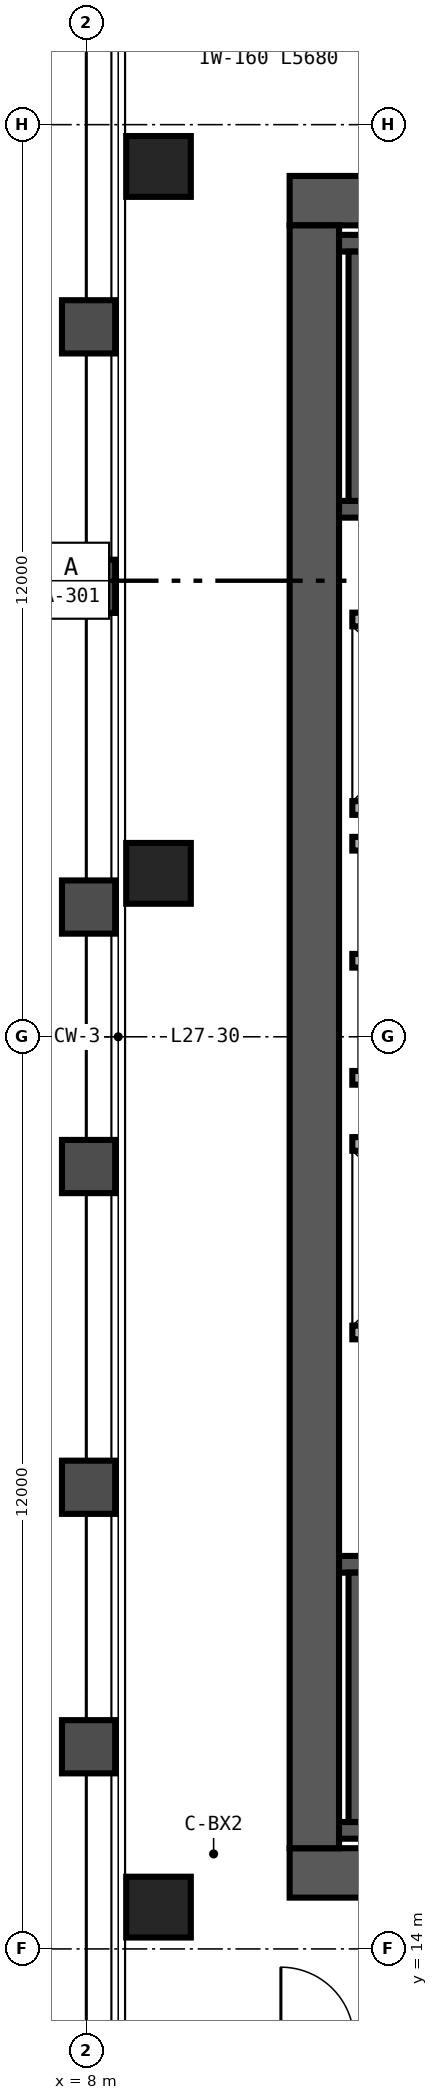
"""IFC4 building model, lengths in metres.
Left out: names, types, materials, properties, quantities, classifications, styles, units other than length and angle.
Written with IfcOpenShell. Run it as: python <this file> out.ifc"""

import sys

from ifc_helpers import new_model, si_unit, direction, frame, frame_2d, origin, origin_2d, place, context, subcontext, project, spatial, rectangle, hollow_rectangle, extrude, source, transform, mapped, element, save


model = new_model("IFC4")
c1 = context("Model", 3, precision=1e-05, world=origin(), true_north=direction((0.0, 1.0)))
c2 = subcontext(c1, "Body", "Model", "MODEL_VIEW")
j1 = project(units=[si_unit("LENGTHUNIT", "METRE"), si_unit("PLANEANGLEUNIT", "RADIAN")], contexts=[c1])
p1 = place(None, origin())
s1 = spatial("IfcSite", under=j1, at=p1, CompositionType="ELEMENT")
p2 = place(p1, origin())
s2 = spatial("IfcBuilding", under=s1, at=p2, CompositionType="ELEMENT")
p3 = place(p2, frame((0.0, 0.0, 111.6)))
s3 = spatial("IfcBuildingStorey", under=s2, at=p3, CompositionType="ELEMENT", Elevation=111.6)
p4 = place(p3, frame((10.675, 15.0, 0.0), z_axis=(0.0, 0.0, 1.0), x_axis=(1.0, 0.0, 0.0)))
e1 = element("IfcWall", 1, at=p4, inside=s3, PredefinedType="SHEAR", context=c2, shape_type="SweptSolid", body=[
    extrude(rectangle(XDim=12.65, YDim=0.65, at=frame_2d((6.325, 0.0))), origin(), (0.0, 0.0, 1.0), 3.36),
])
p5 = place(p4, frame((10.225, 0.0, 0.0)))
e2 = element("IfcOpeningElement", 2, at=p5, cuts=e1, PredefinedType="OPENING", context=c2, shape_type="SweptSolid", body=[
    extrude(rectangle(XDim=1.0, YDim=2.15, at=frame_2d((0.5, 1.075))), frame((0.0, 0.335, 0.0), z_axis=(0.0, -1.0, 0.0), x_axis=(1.0, 0.0, 0.0)), (0.0, 0.0, 1.0), 0.67),
])
p6 = place(p3, frame((10.675, 37.0, 0.0), z_axis=(0.0, 0.0, 1.0), x_axis=(1.0, 0.0, 0.0)))
e3 = element("IfcWall", 3, at=p6, inside=s3, PredefinedType="SHEAR", context=c2, shape_type="SweptSolid", body=[
    extrude(rectangle(XDim=12.65, YDim=0.65, at=frame_2d((6.325, 0.0))), origin(), (0.0, 0.0, 1.0), 3.36),
])
p7 = place(p6, frame((8.905, 0.0, 0.0)))
e4 = element("IfcOpeningElement", 4, at=p7, cuts=e3, PredefinedType="OPENING", context=c2, shape_type="SweptSolid", body=[
    extrude(rectangle(XDim=1.0, YDim=2.15, at=frame_2d((0.5, 1.075))), frame((0.0, 0.335, 0.0), z_axis=(0.0, -1.0, 0.0), x_axis=(1.0, 0.0, 0.0)), (0.0, 0.0, 1.0), 0.67),
])
p8 = place(p3, frame((11.0, 15.325, 0.0), z_axis=(0.0, 0.0, 1.0), x_axis=(0.0, 1.0, 0.0)))
e5 = element("IfcWall", 5, at=p8, inside=s3, PredefinedType="SHEAR", context=c2, shape_type="SweptSolid", body=[
    extrude(rectangle(XDim=21.35, YDim=0.65, at=frame_2d((10.675, 0.0))), origin(), (0.0, 0.0, 1.0), 3.36),
])
p9 = place(p3, frame((11.325, 15.56, 0.0), z_axis=(0.0, 0.0, 1.0), x_axis=(1.0, 0.0, 0.0)))
e6 = element("IfcWall", 6, at=p9, inside=s3, PredefinedType="SHEAR", context=c2, shape_type="SweptSolid", body=[
    extrude(rectangle(XDim=7.985, YDim=0.22, at=frame_2d((3.993, 0.0))), origin(), (0.0, 0.0, 1.0), 3.4),
])
p10 = place(p3, frame((11.325, 19.06, 0.0), z_axis=(0.0, 0.0, 1.0), x_axis=(1.0, 0.0, 0.0)))
e7 = element("IfcWall", 7, at=p10, inside=s3, PredefinedType="SHEAR", context=c2, shape_type="SweptSolid", body=[
    extrude(rectangle(XDim=7.985, YDim=0.22, at=frame_2d((3.993, 0.0))), origin(), (0.0, 0.0, 1.0), 3.4),
])
p11 = place(p10, frame((0.595, 0.0, 0.0)))
e8 = element("IfcOpeningElement", 8, at=p11, cuts=e7, PredefinedType="OPENING", context=c2, shape_type="SweptSolid", body=[
    extrude(rectangle(XDim=1.05, YDim=2.15, at=frame_2d((0.525, 1.075))), frame((0.0, 0.12, 0.0), z_axis=(0.0, -1.0, 0.0), x_axis=(1.0, 0.0, 0.0)), (0.0, 0.0, 1.0), 0.24),
])
p12 = place(p3, frame((11.56, 15.67, 0.0), z_axis=(0.0, 0.0, 1.0), x_axis=(0.0, 1.0, 0.0)))
e9 = element("IfcWall", 9, at=p12, inside=s3, PredefinedType="SHEAR", context=c2, shape_type="SweptSolid", body=[
    extrude(rectangle(XDim=3.28, YDim=0.22, at=frame_2d((1.64, 0.0))), origin(), (0.0, 0.0, 1.0), 3.4),
])
p13 = place(p3, frame((11.325, 32.94, 0.0), z_axis=(0.0, 0.0, 1.0), x_axis=(1.0, 0.0, 0.0)))
e10 = element("IfcWall", 10, at=p13, inside=s3, PredefinedType="SHEAR", context=c2, shape_type="SweptSolid", body=[
    extrude(rectangle(XDim=7.985, YDim=0.22, at=frame_2d((3.993, 0.0))), origin(), (0.0, 0.0, 1.0), 3.4),
])
p14 = place(p13, frame((0.595, 0.0, 0.0)))
e11 = element("IfcOpeningElement", 11, at=p14, cuts=e10, PredefinedType="OPENING", context=c2, shape_type="SweptSolid", body=[
    extrude(rectangle(XDim=1.05, YDim=2.15, at=frame_2d((0.525, 1.075))), frame((0.0, 0.12, 0.0), z_axis=(0.0, -1.0, 0.0), x_axis=(1.0, 0.0, 0.0)), (0.0, 0.0, 1.0), 0.24),
])
p15 = place(p3, frame((11.325, 36.44, 0.0), z_axis=(0.0, 0.0, 1.0), x_axis=(1.0, 0.0, 0.0)))
e12 = element("IfcWall", 12, at=p15, inside=s3, PredefinedType="SHEAR", context=c2, shape_type="SweptSolid", body=[
    extrude(rectangle(XDim=7.985, YDim=0.22, at=frame_2d((3.993, 0.0))), origin(), (0.0, 0.0, 1.0), 3.4),
])
p16 = place(p3, frame((11.56, 33.05, 0.0), z_axis=(0.0, 0.0, 1.0), x_axis=(0.0, 1.0, 0.0)))
e13 = element("IfcWall", 13, at=p16, inside=s3, PredefinedType="SHEAR", context=c2, shape_type="SweptSolid", body=[
    extrude(rectangle(XDim=3.28, YDim=0.22, at=frame_2d((1.64, 0.0))), origin(), (0.0, 0.0, 1.0), 3.4),
])
m1 = source(origin(), c2, "Body", "SweptSolid", [
    extrude(hollow_rectangle(XDim=0.85, YDim=0.8, WallThickness=0.032, at=origin_2d()), origin(), (0.0, 0.0, 1.0), 3.36),
])
for number, where, z_axis, x_axis in (
    (14, (8.95, 14.55, 0.0), (0.0, 0.0, 1.0), (1.0, 0.0, 0.0)),
    (15, (8.95, 28.15, 0.0), (0.0, 0.0, 1.0), (1.0, 0.0, 0.0)),
    (16, (8.95, 37.45, 0.0), (0.0, 0.0, 1.0), (1.0, 0.0, 0.0)),
):
    element("IfcColumn", number, at=place(p3, frame(where, z_axis=z_axis, x_axis=x_axis)), inside=s3, PredefinedType="COLUMN", context=c2, shape_type="MappedRepresentation", body=[
        mapped(m1, transform((0.0, 0.0, 0.0), scale=1.0)),
    ])
for number, where, z_axis, x_axis in (
    (17, (11.5, 22.11, 0.0), (0.0, 0.0, 1.0), (1.0, 0.0, 0.0)),
    (18, (11.5, 24.59, 0.0), (0.0, 0.0, 1.0), (1.0, 0.0, 0.0)),
    (19, (11.5, 29.01, 0.0), (0.0, 0.0, 1.0), (1.0, 0.0, 0.0)),
    (20, (11.5, 31.49, 0.0), (0.0, 0.0, 1.0), (1.0, 0.0, 0.0)),
):
    element("IfcWall", number, at=place(p3, frame(where, z_axis=z_axis, x_axis=x_axis)), inside=s3, PredefinedType="SOLIDWALL", context=c2, shape_type="SweptSolid", body=[
        extrude(rectangle(XDim=2.5, YDim=0.18, at=frame_2d((1.25, 0.0))), origin(), (0.0, 0.0, 1.0), 3.36),
    ])
for number, where, z_axis, x_axis in (
    (21, (11.5, 25.46, 0.0), (0.0, 0.0, 1.0), (1.0, 0.0, 0.0)),
    (22, (11.5, 27.0, 0.0), (0.0, 0.0, 1.0), (1.0, 0.0, 0.0)),
    (23, (11.5, 28.54, 0.0), (0.0, 0.0, 1.0), (1.0, 0.0, 0.0)),
):
    element("IfcWall", number, at=place(p3, frame(where, z_axis=z_axis, x_axis=x_axis)), inside=s3, PredefinedType="SOLIDWALL", context=c2, shape_type="SweptSolid", body=[
        extrude(rectangle(XDim=2.51, YDim=0.18, at=frame_2d((1.255, 0.0))), origin(), (0.0, 0.0, 1.0), 3.36),
    ])
save(model, sys.argv[1])
